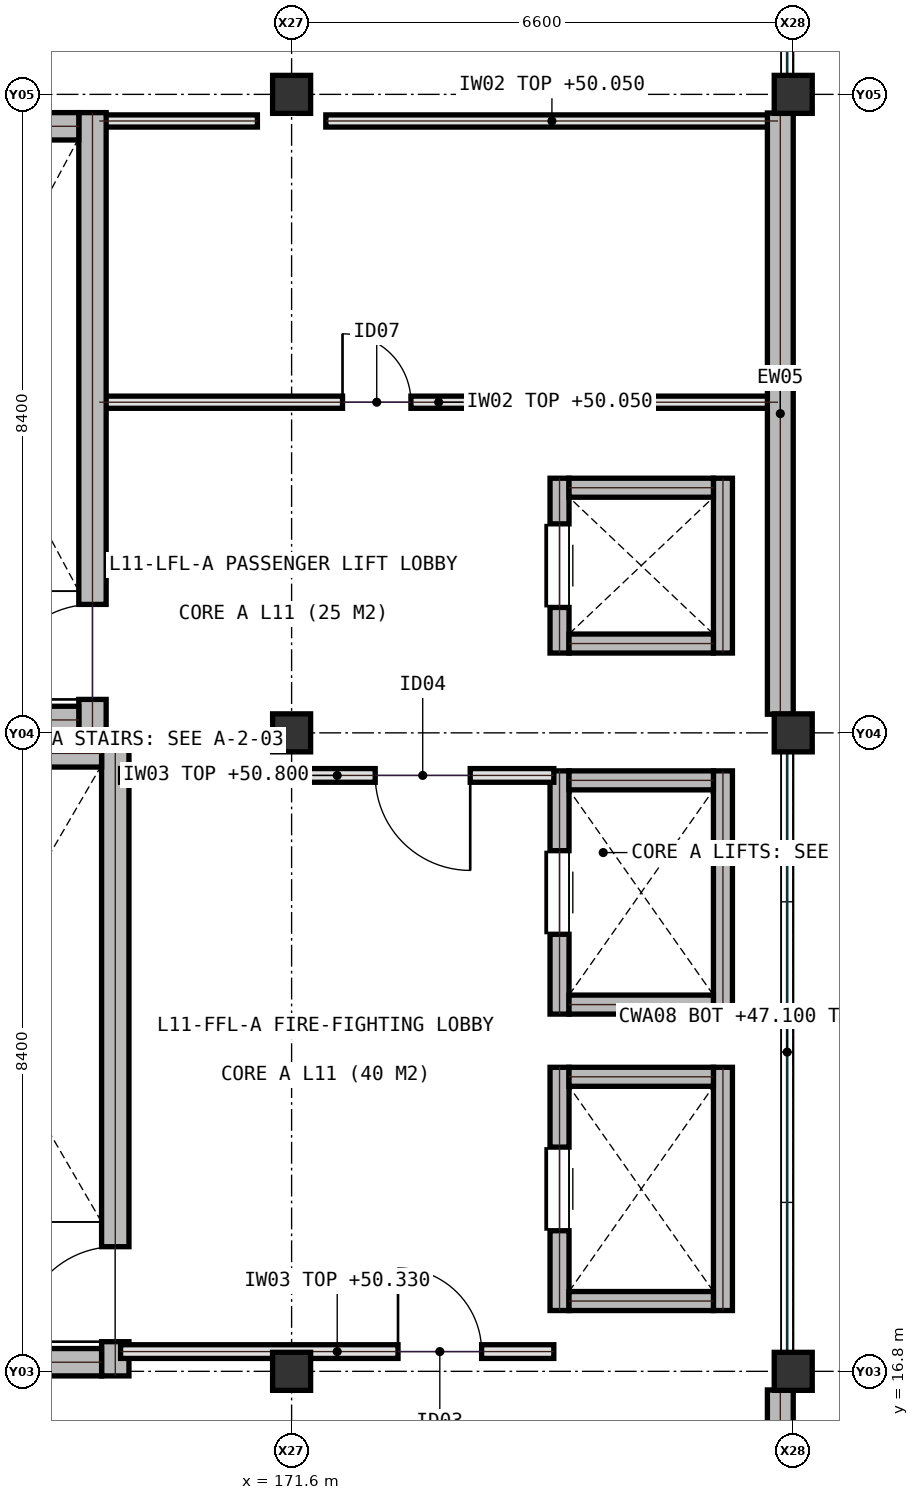
"""IFC4 building model, lengths in metres.
Left out: names, types, materials, properties, quantities, classifications, styles, units other than length and angle.
Written with IfcOpenShell. Run it as: python <this file> out.ifc"""

import sys

from ifc_helpers import new_model, si_unit, direction, frame, frame_2d, origin, origin_2d, place, context, subcontext, project, spatial, rectangle, extrude, element, fill, save


model = new_model("IFC4")
c1 = context("Model", 3, precision=1e-05, world=origin(), true_north=direction((0.0, 1.0)))
c2 = subcontext(c1, "Body", "Model", "MODEL_VIEW")
j1 = project(units=[si_unit("LENGTHUNIT", "METRE"), si_unit("PLANEANGLEUNIT", "RADIAN")], contexts=[c1])
p1 = place(None, origin())
s1 = spatial("IfcSite", under=j1, at=p1, CompositionType="ELEMENT")
p2 = place(p1, origin())
s2 = spatial("IfcBuilding", under=s1, at=p2, CompositionType="ELEMENT")
p3 = place(p2, frame((0.0, 0.0, 47.1)))
s3 = spatial("IfcBuildingStorey", under=s2, at=p3, CompositionType="ELEMENT", Elevation=47.1)
for number, where, z_axis, x_axis in (
    (1, (171.6, 16.8, 0.0), (0.0, 0.0, 1.0), (1.0, 0.0, 0.0)),
    (2, (171.6, 25.2, 0.0), (0.0, 0.0, 1.0), (1.0, 0.0, 0.0)),
    (3, (171.6, 33.6, 0.0), (0.0, 0.0, 1.0), (1.0, 0.0, 0.0)),
    (4, (178.2, 16.8, 0.0), (0.0, 0.0, 1.0), (1.0, 0.0, 0.0)),
    (5, (178.2, 25.2, 0.0), (0.0, 0.0, 1.0), (1.0, 0.0, 0.0)),
    (6, (178.2, 33.6, 0.0), (0.0, 0.0, 1.0), (1.0, 0.0, 0.0)),
):
    element("IfcColumn", number, at=place(p3, frame(where, z_axis=z_axis, x_axis=x_axis)), inside=s3, PredefinedType="COLUMN", context=c2, shape_type="SweptSolid", body=[
        extrude(rectangle(XDim=0.5, YDim=0.5, at=origin_2d()), origin(), (0.0, 0.0, 1.0), 3.9),
    ])
p4 = place(p3, frame((169.07, 29.55, 0.0), z_axis=(0.0, 0.0, 1.0), x_axis=(1.0, 0.0, 0.0)))
e7 = element("IfcWall", 7, at=p4, inside=s3, PredefinedType="PARTITIONING", context=c2, shape_type="SweptSolid", body=[
    extrude(rectangle(XDim=8.93, YDim=0.16, at=frame_2d((4.465, 0.0))), origin(), (0.0, 0.0, 1.0), 2.95),
])
p5 = place(p4, frame((3.2, 0.0, 0.0)))
e8 = element("IfcOpeningElement", 8, at=p5, cuts=e7, PredefinedType="OPENING", context=c2, shape_type="SweptSolid", body=[
    extrude(rectangle(XDim=0.9, YDim=2.1, at=frame_2d((0.45, 1.05))), frame((0.0, 0.09, 0.0), z_axis=(0.0, -1.0, 0.0), x_axis=(1.0, 0.0, 0.0)), (0.0, 0.0, 1.0), 0.18),
])
p6 = place(p3, frame((169.07, 33.25, 0.0), z_axis=(0.0, 0.0, 1.0), x_axis=(1.0, 0.0, 0.0)))
e9 = element("IfcWall", 9, at=p6, inside=s3, PredefinedType="PARTITIONING", context=c2, shape_type="SweptSolid", body=[
    extrude(rectangle(XDim=2.08, YDim=0.16, at=frame_2d((1.04, 0.0))), origin(), (0.0, 0.0, 1.0), 2.95),
])
p7 = place(p3, frame((172.05, 33.25, 0.0), z_axis=(0.0, 0.0, 1.0), x_axis=(1.0, 0.0, 0.0)))
e10 = element("IfcWall", 10, at=p7, inside=s3, PredefinedType="PARTITIONING", context=c2, shape_type="SweptSolid", body=[
    extrude(rectangle(XDim=5.95, YDim=0.16, at=frame_2d((2.975, 0.0))), origin(), (0.0, 0.0, 1.0), 2.95),
])
for number, where, z_axis, x_axis in (
    (11, (178.03, 8.645, 0.0), (0.0, 0.0, 1.0), (0.0, 1.0, 0.0)),
    (12, (178.03, 25.445, 0.0), (0.0, 0.0, 1.0), (0.0, 1.0, 0.0)),
):
    element("IfcWall", number, at=place(p3, frame(where, z_axis=z_axis, x_axis=x_axis)), inside=s3, PredefinedType="SHEAR", context=c2, shape_type="SweptSolid", body=[
        extrude(rectangle(XDim=7.91, YDim=0.34, at=frame_2d((3.955, 0.0))), origin(), (0.0, 0.0, 1.0), 3.7),
    ])
p8 = place(p3, frame((169.28, 16.74, 0.0), z_axis=(0.0, 0.0, 1.0), x_axis=(0.0, 1.0, 0.0)))
e13 = element("IfcWall", 13, at=p8, inside=s3, PredefinedType="SHEAR", context=c2, shape_type="SweptSolid", body=[
    extrude(rectangle(XDim=8.37, YDim=0.36, at=frame_2d((4.185, 0.0))), origin(), (0.0, 0.0, 1.0), 3.7),
])
p9 = place(p8, frame((0.45, 0.0, 0.0)))
e14 = element("IfcOpeningElement", 14, at=p9, cuts=e13, PredefinedType="OPENING", context=c2, shape_type="SweptSolid", body=[
    extrude(rectangle(XDim=1.25, YDim=2.15, at=frame_2d((0.625, 1.075))), frame((0.0, 0.19, 0.0), z_axis=(0.0, -1.0, 0.0), x_axis=(1.0, 0.0, 0.0)), (0.0, 0.0, 1.0), 0.38),
])
for number, where, z_axis, x_axis in (
    (15, (165.6, 24.93, 0.0), (0.0, 0.0, 1.0), (1.0, 0.0, 0.0)),
    (16, (165.6, 16.92, 0.0), (0.0, 0.0, 1.0), (1.0, 0.0, 0.0)),
):
    element("IfcWall", number, at=place(p3, frame(where, z_axis=z_axis, x_axis=x_axis)), inside=s3, PredefinedType="SHEAR", context=c2, shape_type="SweptSolid", body=[
        extrude(rectangle(XDim=3.5, YDim=0.36, at=frame_2d((1.75, 0.0))), origin(), (0.0, 0.0, 1.0), 3.7),
    ])
p10 = place(p3, frame((168.98, 25.19, 0.0), z_axis=(0.0, 0.0, 1.0), x_axis=(0.0, 1.0, 0.0)))
e17 = element("IfcWall", 17, at=p10, inside=s3, PredefinedType="SHEAR", context=c2, shape_type="SweptSolid", body=[
    extrude(rectangle(XDim=8.17, YDim=0.36, at=frame_2d((4.085, 0.0))), origin(), (0.0, 0.0, 1.0), 3.7),
])
p11 = place(p10, frame((0.45, 0.0, 0.0)))
e18 = element("IfcOpeningElement", 18, at=p11, cuts=e17, PredefinedType="OPENING", context=c2, shape_type="SweptSolid", body=[
    extrude(rectangle(XDim=1.25, YDim=2.15, at=frame_2d((0.625, 1.075))), frame((0.0, 0.19, 0.0), z_axis=(0.0, -1.0, 0.0), x_axis=(1.0, 0.0, 0.0)), (0.0, 0.0, 1.0), 0.38),
])
for number, where, z_axis, x_axis in (
    (19, (165.6, 33.18, 0.0), (0.0, 0.0, 1.0), (1.0, 0.0, 0.0)),
    (20, (165.6, 25.37, 0.0), (0.0, 0.0, 1.0), (1.0, 0.0, 0.0)),
):
    element("IfcWall", number, at=place(p3, frame(where, z_axis=z_axis, x_axis=x_axis)), inside=s3, PredefinedType="SHEAR", context=c2, shape_type="SweptSolid", body=[
        extrude(rectangle(XDim=3.2, YDim=0.36, at=frame_2d((1.6, 0.0))), origin(), (0.0, 0.0, 1.0), 3.7),
    ])
p12 = place(p3, frame((175.125, 17.6, 0.0), z_axis=(0.0, 0.0, 1.0), x_axis=(0.0, 1.0, 0.0)))
e21 = element("IfcWall", 21, at=p12, inside=s3, PredefinedType="SHEAR", context=c2, shape_type="SweptSolid", body=[
    extrude(rectangle(XDim=3.2, YDim=0.25, at=frame_2d((1.6, 0.0))), origin(), (0.0, 0.0, 1.0), 3.7),
])
p13 = place(p12, frame((1.05, 0.0, 0.0)))
e22 = element("IfcOpeningElement", 22, at=p13, cuts=e21, PredefinedType="OPENING", context=c2, shape_type="SweptSolid", body=[
    extrude(rectangle(XDim=1.1, YDim=2.15, at=frame_2d((0.55, 1.075))), frame((0.0, 0.135, 0.0), z_axis=(0.0, -1.0, 0.0), x_axis=(1.0, 0.0, 0.0)), (0.0, 0.0, 1.0), 0.27),
])
p14 = place(p3, frame((177.275, 17.6, 0.0), z_axis=(0.0, 0.0, 1.0), x_axis=(0.0, 1.0, 0.0)))
e23 = element("IfcWall", 23, at=p14, inside=s3, PredefinedType="SHEAR", context=c2, shape_type="SweptSolid", body=[
    extrude(rectangle(XDim=3.2, YDim=0.25, at=frame_2d((1.6, 0.0))), origin(), (0.0, 0.0, 1.0), 3.7),
])
for number, where, z_axis, x_axis in (
    (24, (175.25, 17.725, 0.0), (0.0, 0.0, 1.0), (1.0, 0.0, 0.0)),
    (25, (175.25, 20.675, 0.0), (0.0, 0.0, 1.0), (1.0, 0.0, 0.0)),
):
    element("IfcWall", number, at=place(p3, frame(where, z_axis=z_axis, x_axis=x_axis)), inside=s3, PredefinedType="SHEAR", context=c2, shape_type="SweptSolid", body=[
        extrude(rectangle(XDim=1.9, YDim=0.25, at=frame_2d((0.95, 0.0))), origin(), (0.0, 0.0, 1.0), 3.7),
    ])
p15 = place(p3, frame((175.125, 21.5, 0.0), z_axis=(0.0, 0.0, 1.0), x_axis=(0.0, 1.0, 0.0)))
e26 = element("IfcWall", 26, at=p15, inside=s3, PredefinedType="SHEAR", context=c2, shape_type="SweptSolid", body=[
    extrude(rectangle(XDim=3.2, YDim=0.25, at=frame_2d((1.6, 0.0))), origin(), (0.0, 0.0, 1.0), 3.7),
])
p16 = place(p15, frame((1.05, 0.0, 0.0)))
e27 = element("IfcOpeningElement", 27, at=p16, cuts=e26, PredefinedType="OPENING", context=c2, shape_type="SweptSolid", body=[
    extrude(rectangle(XDim=1.1, YDim=2.15, at=frame_2d((0.55, 1.075))), frame((0.0, 0.135, 0.0), z_axis=(0.0, -1.0, 0.0), x_axis=(1.0, 0.0, 0.0)), (0.0, 0.0, 1.0), 0.27),
])
p17 = place(p3, frame((177.275, 21.5, 0.0), z_axis=(0.0, 0.0, 1.0), x_axis=(0.0, 1.0, 0.0)))
e28 = element("IfcWall", 28, at=p17, inside=s3, PredefinedType="SHEAR", context=c2, shape_type="SweptSolid", body=[
    extrude(rectangle(XDim=3.2, YDim=0.25, at=frame_2d((1.6, 0.0))), origin(), (0.0, 0.0, 1.0), 3.7),
])
for number, where, z_axis, x_axis in (
    (29, (175.25, 21.625, 0.0), (0.0, 0.0, 1.0), (1.0, 0.0, 0.0)),
    (30, (175.25, 24.575, 0.0), (0.0, 0.0, 1.0), (1.0, 0.0, 0.0)),
):
    element("IfcWall", number, at=place(p3, frame(where, z_axis=z_axis, x_axis=x_axis)), inside=s3, PredefinedType="SHEAR", context=c2, shape_type="SweptSolid", body=[
        extrude(rectangle(XDim=1.9, YDim=0.25, at=frame_2d((0.95, 0.0))), origin(), (0.0, 0.0, 1.0), 3.7),
    ])
p18 = place(p3, frame((175.125, 26.25, 0.0), z_axis=(0.0, 0.0, 1.0), x_axis=(0.0, 1.0, 0.0)))
e31 = element("IfcWall", 31, at=p18, inside=s3, PredefinedType="SHEAR", context=c2, shape_type="SweptSolid", body=[
    extrude(rectangle(XDim=2.3, YDim=0.25, at=frame_2d((1.15, 0.0))), origin(), (0.0, 0.0, 1.0), 3.7),
])
p19 = place(p18, frame((0.6, 0.0, 0.0)))
e32 = element("IfcOpeningElement", 32, at=p19, cuts=e31, PredefinedType="OPENING", context=c2, shape_type="SweptSolid", body=[
    extrude(rectangle(XDim=1.1, YDim=2.15, at=frame_2d((0.55, 1.075))), frame((0.0, 0.135, 0.0), z_axis=(0.0, -1.0, 0.0), x_axis=(1.0, 0.0, 0.0)), (0.0, 0.0, 1.0), 0.27),
])
p20 = place(p3, frame((177.275, 26.25, 0.0), z_axis=(0.0, 0.0, 1.0), x_axis=(0.0, 1.0, 0.0)))
e33 = element("IfcWall", 33, at=p20, inside=s3, PredefinedType="SHEAR", context=c2, shape_type="SweptSolid", body=[
    extrude(rectangle(XDim=2.3, YDim=0.25, at=frame_2d((1.15, 0.0))), origin(), (0.0, 0.0, 1.0), 3.7),
])
for number, where, z_axis, x_axis in (
    (34, (175.25, 26.375, 0.0), (0.0, 0.0, 1.0), (1.0, 0.0, 0.0)),
    (35, (175.25, 28.425, 0.0), (0.0, 0.0, 1.0), (1.0, 0.0, 0.0)),
):
    element("IfcWall", number, at=place(p3, frame(where, z_axis=z_axis, x_axis=x_axis)), inside=s3, PredefinedType="SHEAR", context=c2, shape_type="SweptSolid", body=[
        extrude(rectangle(XDim=1.9, YDim=0.25, at=frame_2d((0.95, 0.0))), origin(), (0.0, 0.0, 1.0), 3.7),
    ])
p21 = place(p3, frame((169.35, 24.64, 0.0), z_axis=(0.0, 0.0, 1.0), x_axis=(1.0, 0.0, 0.0)))
e36 = element("IfcWall", 36, at=p21, inside=s3, PredefinedType="SOLIDWALL", context=c2, shape_type="SweptSolid", body=[
    extrude(rectangle(XDim=5.7, YDim=0.18, at=frame_2d((2.85, 0.0))), origin(), (0.0, 0.0, 1.0), 3.7),
])
p22 = place(p21, frame((3.35, 0.0, 0.0)))
e37 = element("IfcOpeningElement", 37, at=p22, cuts=e36, PredefinedType="OPENING", context=c2, shape_type="SweptSolid", body=[
    extrude(rectangle(XDim=1.25, YDim=2.15, at=frame_2d((0.625, 1.075))), frame((0.0, 0.1, 0.0), z_axis=(0.0, -1.0, 0.0), x_axis=(1.0, 0.0, 0.0)), (0.0, 0.0, 1.0), 0.2),
])
p23 = place(p3, frame((169.35, 17.06, 0.0), z_axis=(0.0, 0.0, 1.0), x_axis=(1.0, 0.0, 0.0)))
e38 = element("IfcWall", 38, at=p23, inside=s3, PredefinedType="SOLIDWALL", context=c2, shape_type="SweptSolid", body=[
    extrude(rectangle(XDim=5.7, YDim=0.18, at=frame_2d((2.85, 0.0))), origin(), (0.0, 0.0, 1.0), 3.23),
])
p24 = place(p23, frame((3.65, 0.0, 0.0)))
e39 = element("IfcOpeningElement", 39, at=p24, cuts=e38, PredefinedType="OPENING", context=c2, shape_type="SweptSolid", body=[
    extrude(rectangle(XDim=1.1, YDim=2.15, at=frame_2d((0.55, 1.075))), frame((0.0, 0.1, 0.0), z_axis=(0.0, -1.0, 0.0), x_axis=(1.0, 0.0, 0.0)), (0.0, 0.0, 1.0), 0.2),
])
p25 = place(p5, origin())
e40 = element("IfcDoor", 40, at=p25, inside=s3, OperationType="SINGLE_SWING_LEFT", PredefinedType="DOOR", context=c2, shape_type="SweptSolid", body=[
    extrude(rectangle(XDim=0.9, YDim=2.1, at=frame_2d((0.45, 1.05))), frame((0.0, 0.025, 0.0), z_axis=(0.0, -1.0, 0.0), x_axis=(1.0, 0.0, 0.0)), (0.0, 0.0, 1.0), 0.05),
])
fill(e8, e40)
p26 = place(p9, origin())
e41 = element("IfcDoor", 41, at=p26, inside=s3, OperationType="SINGLE_SWING_LEFT", PredefinedType="DOOR", context=c2, shape_type="SweptSolid", body=[
    extrude(rectangle(XDim=1.25, YDim=2.15, at=frame_2d((0.625, 1.075))), frame((0.0, 0.025, 0.0), z_axis=(0.0, -1.0, 0.0), x_axis=(1.0, 0.0, 0.0)), (0.0, 0.0, 1.0), 0.05),
])
fill(e14, e41)
p27 = place(p11, origin())
e42 = element("IfcDoor", 42, at=p27, inside=s3, OperationType="SINGLE_SWING_LEFT", PredefinedType="DOOR", context=c2, shape_type="SweptSolid", body=[
    extrude(rectangle(XDim=1.25, YDim=2.15, at=frame_2d((0.625, 1.075))), frame((0.0, 0.025, 0.0), z_axis=(0.0, -1.0, 0.0), x_axis=(1.0, 0.0, 0.0)), (0.0, 0.0, 1.0), 0.05),
])
fill(e18, e42)
p28 = place(p13, origin())
e43 = element("IfcDoor", 43, at=p28, inside=s3, OperationType="SLIDING_TO_LEFT", PredefinedType="DOOR", context=c2, shape_type="SweptSolid", body=[
    extrude(rectangle(XDim=1.1, YDim=2.15, at=frame_2d((0.55, 1.075))), frame((0.0, 0.025, 0.0), z_axis=(0.0, -1.0, 0.0), x_axis=(1.0, 0.0, 0.0)), (0.0, 0.0, 1.0), 0.05),
])
fill(e22, e43)
p29 = place(p16, origin())
e44 = element("IfcDoor", 44, at=p29, inside=s3, OperationType="SLIDING_TO_LEFT", PredefinedType="DOOR", context=c2, shape_type="SweptSolid", body=[
    extrude(rectangle(XDim=1.1, YDim=2.15, at=frame_2d((0.55, 1.075))), frame((0.0, 0.025, 0.0), z_axis=(0.0, -1.0, 0.0), x_axis=(1.0, 0.0, 0.0)), (0.0, 0.0, 1.0), 0.05),
])
fill(e27, e44)
p30 = place(p19, origin())
e45 = element("IfcDoor", 45, at=p30, inside=s3, OperationType="SLIDING_TO_LEFT", PredefinedType="DOOR", context=c2, shape_type="SweptSolid", body=[
    extrude(rectangle(XDim=1.1, YDim=2.15, at=frame_2d((0.55, 1.075))), frame((0.0, 0.025, 0.0), z_axis=(0.0, -1.0, 0.0), x_axis=(1.0, 0.0, 0.0)), (0.0, 0.0, 1.0), 0.05),
])
fill(e32, e45)
p31 = place(p22, frame((1.25, 0.0, 0.0), z_axis=(0.0, 0.0, 1.0), x_axis=(-1.0, 0.0, 0.0)))
e46 = element("IfcDoor", 46, at=p31, inside=s3, OperationType="SINGLE_SWING_RIGHT", PredefinedType="DOOR", context=c2, shape_type="SweptSolid", body=[
    extrude(rectangle(XDim=1.25, YDim=2.15, at=frame_2d((0.625, 1.075))), frame((0.0, 0.025, 0.0), z_axis=(0.0, -1.0, 0.0), x_axis=(1.0, 0.0, 0.0)), (0.0, 0.0, 1.0), 0.05),
])
fill(e37, e46)
p32 = place(p24, origin())
e47 = element("IfcDoor", 47, at=p32, inside=s3, OperationType="SINGLE_SWING_LEFT", PredefinedType="DOOR", context=c2, shape_type="SweptSolid", body=[
    extrude(rectangle(XDim=1.1, YDim=2.15, at=frame_2d((0.55, 1.075))), frame((0.0, 0.025, 0.0), z_axis=(0.0, -1.0, 0.0), x_axis=(1.0, 0.0, 0.0)), (0.0, 0.0, 1.0), 0.05),
])
fill(e39, e47)
save(model, sys.argv[1])
